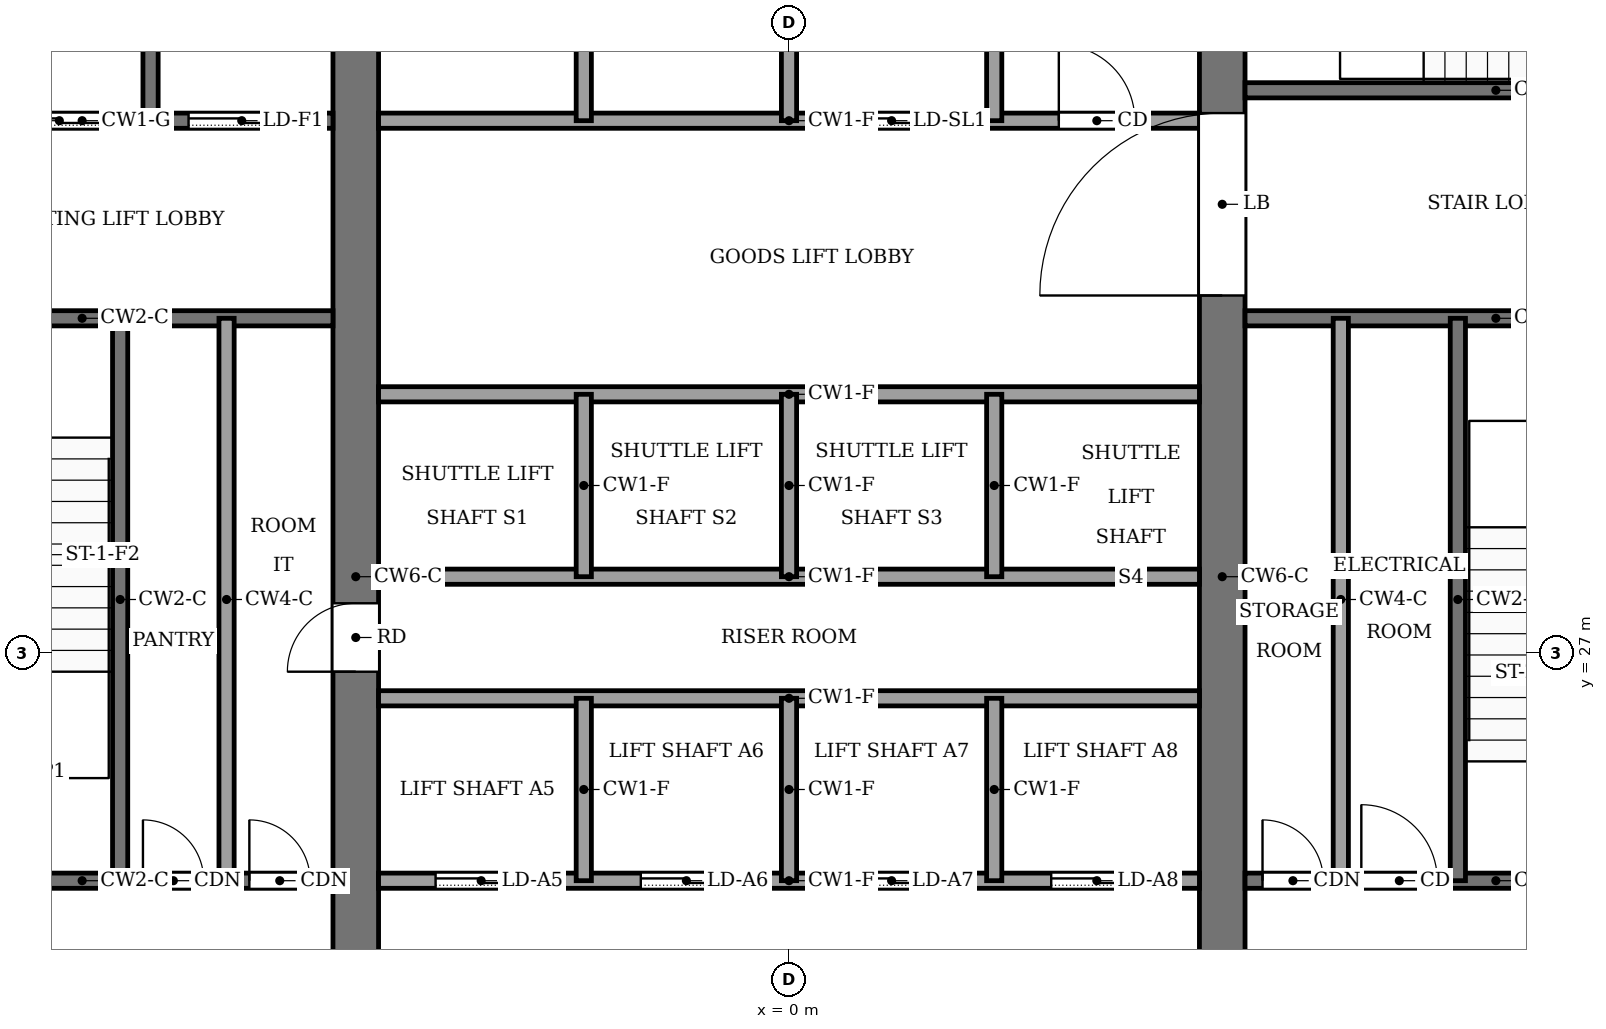
"""IFC4 building model, lengths in metres.
Left out: names, types, materials, properties, quantities, classifications, styles, units other than length and angle.
Written with IfcOpenShell. Run it as: python <this file> out.ifc"""

import sys

from ifc_helpers import new_model, si_unit, direction, frame, frame_2d, origin, place, context, subcontext, project, spatial, rectangle, extrude, element, fill, save


model = new_model("IFC4")
c1 = context("Model", 3, precision=1e-05, world=origin(), true_north=direction((0.0, 1.0)))
c2 = subcontext(c1, "Body", "Model", "MODEL_VIEW")
j1 = project(units=[si_unit("LENGTHUNIT", "METRE"), si_unit("PLANEANGLEUNIT", "RADIAN")], contexts=[c1])
p1 = place(None, origin())
s1 = spatial("IfcSite", under=j1, at=p1, CompositionType="ELEMENT")
p2 = place(p1, origin())
s2 = spatial("IfcBuilding", under=s1, at=p2, CompositionType="ELEMENT")
p3 = place(p2, frame((0.0, 0.0, 182.0)))
s3 = spatial("IfcBuildingStorey", under=s2, at=p3, CompositionType="ELEMENT", Elevation=182.0)
p4 = place(p3, frame((-5.7, 18.4, -0.13), z_axis=(0.0, 0.0, 1.0), x_axis=(0.0, 1.0, 0.0)))
e1 = element("IfcWall", 1, at=p4, inside=s3, PredefinedType="SHEAR", context=c2, shape_type="SweptSolid", body=[
    extrude(rectangle(XDim=19.2, YDim=0.6, at=frame_2d((9.6, 0.0))), origin(), (0.0, 0.0, 1.0), 4.0),
])
p5 = place(p4, frame((8.35, 0.0, 0.13)))
e2 = element("IfcOpeningElement", 2, at=p5, cuts=e1, PredefinedType="OPENING", context=c2, shape_type="SweptSolid", body=[
    extrude(rectangle(XDim=0.9, YDim=2.1, at=frame_2d((0.45, 1.05))), frame((0.0, 0.31, 0.0), z_axis=(0.0, -1.0, 0.0), x_axis=(1.0, 0.0, 0.0)), (0.0, 0.0, 1.0), 0.62),
])
p6 = place(p3, frame((5.7, 18.4, -0.13), z_axis=(0.0, 0.0, 1.0), x_axis=(0.0, 1.0, 0.0)))
e3 = element("IfcWall", 3, at=p6, inside=s3, PredefinedType="SHEAR", context=c2, shape_type="SweptSolid", body=[
    extrude(rectangle(XDim=19.2, YDim=0.6, at=frame_2d((9.6, 0.0))), origin(), (0.0, 0.0, 1.0), 4.0),
])
p7 = place(p6, frame((13.3, 0.0, 0.13)))
e4 = element("IfcOpeningElement", 4, at=p7, cuts=e3, PredefinedType="OPENING", context=c2, shape_type="SweptSolid", body=[
    extrude(rectangle(XDim=2.4, YDim=2.4, at=frame_2d((1.2, 1.2))), frame((0.0, 0.31, 0.0), z_axis=(0.0, -1.0, 0.0), x_axis=(1.0, 0.0, 0.0)), (0.0, 0.0, 1.0), 0.62),
])
p8 = place(p3, frame((-12.6, 24.0, 0.0), z_axis=(0.0, 0.0, 1.0), x_axis=(1.0, 0.0, 0.0)))
e5 = element("IfcWall", 5, at=p8, inside=s3, PredefinedType="PARTITIONING", context=c2, shape_type="SweptSolid", body=[
    extrude(rectangle(XDim=6.6, YDim=0.2, at=frame_2d((3.3, 0.0))), origin(), (0.0, 0.0, 1.0), 3.87),
])
p9 = place(p8, frame((4.1, 0.0, 0.0)))
e6 = element("IfcOpeningElement", 6, at=p9, cuts=e5, PredefinedType="OPENING", context=c2, shape_type="SweptSolid", body=[
    extrude(rectangle(XDim=0.8, YDim=2.1, at=frame_2d((0.4, 1.05))), frame((0.0, 0.11, 0.0), z_axis=(0.0, -1.0, 0.0), x_axis=(1.0, 0.0, 0.0)), (0.0, 0.0, 1.0), 0.22),
])
p10 = place(p8, frame((5.5, 0.0, 0.0)))
e7 = element("IfcOpeningElement", 7, at=p10, cuts=e5, PredefinedType="OPENING", context=c2, shape_type="SweptSolid", body=[
    extrude(rectangle(XDim=0.8, YDim=2.1, at=frame_2d((0.4, 1.05))), frame((0.0, 0.11, 0.0), z_axis=(0.0, -1.0, 0.0), x_axis=(1.0, 0.0, 0.0)), (0.0, 0.0, 1.0), 0.22),
])
p11 = place(p3, frame((-5.4, 24.0, 0.0), z_axis=(0.0, 0.0, 1.0), x_axis=(1.0, 0.0, 0.0)))
e8 = element("IfcWall", 8, at=p11, inside=s3, PredefinedType="PARTITIONING", context=c2, shape_type="SweptSolid", body=[
    extrude(rectangle(XDim=10.8, YDim=0.2, at=frame_2d((5.4, 0.0))), origin(), (0.0, 0.0, 1.0), 3.87),
])
p12 = place(p11, frame((0.75, 0.0, 0.0)))
e9 = element("IfcOpeningElement", 9, at=p12, cuts=e8, PredefinedType="OPENING", context=c2, shape_type="SweptSolid", body=[
    extrude(rectangle(XDim=1.2, YDim=2.2, at=frame_2d((0.6, 1.1))), frame((0.0, 0.11, 0.0), z_axis=(0.0, -1.0, 0.0), x_axis=(1.0, 0.0, 0.0)), (0.0, 0.0, 1.0), 0.22),
])
p13 = place(p11, frame((3.45, 0.0, 0.0)))
e10 = element("IfcOpeningElement", 10, at=p13, cuts=e8, PredefinedType="OPENING", context=c2, shape_type="SweptSolid", body=[
    extrude(rectangle(XDim=1.2, YDim=2.2, at=frame_2d((0.6, 1.1))), frame((0.0, 0.11, 0.0), z_axis=(0.0, -1.0, 0.0), x_axis=(1.0, 0.0, 0.0)), (0.0, 0.0, 1.0), 0.22),
])
p14 = place(p11, frame((6.15, 0.0, 0.0)))
e11 = element("IfcOpeningElement", 11, at=p14, cuts=e8, PredefinedType="OPENING", context=c2, shape_type="SweptSolid", body=[
    extrude(rectangle(XDim=1.2, YDim=2.2, at=frame_2d((0.6, 1.1))), frame((0.0, 0.11, 0.0), z_axis=(0.0, -1.0, 0.0), x_axis=(1.0, 0.0, 0.0)), (0.0, 0.0, 1.0), 0.22),
])
p15 = place(p11, frame((8.85, 0.0, 0.0)))
e12 = element("IfcOpeningElement", 12, at=p15, cuts=e8, PredefinedType="OPENING", context=c2, shape_type="SweptSolid", body=[
    extrude(rectangle(XDim=1.2, YDim=2.2, at=frame_2d((0.6, 1.1))), frame((0.0, 0.11, 0.0), z_axis=(0.0, -1.0, 0.0), x_axis=(1.0, 0.0, 0.0)), (0.0, 0.0, 1.0), 0.22),
])
p16 = place(p3, frame((6.0, 24.0, 0.0), z_axis=(0.0, 0.0, 1.0), x_axis=(1.0, 0.0, 0.0)))
e13 = element("IfcWall", 13, at=p16, inside=s3, PredefinedType="PARTITIONING", context=c2, shape_type="SweptSolid", body=[
    extrude(rectangle(XDim=6.6, YDim=0.2, at=frame_2d((3.3, 0.0))), origin(), (0.0, 0.0, 1.0), 3.87),
])
p17 = place(p16, frame((0.23, 0.0, 0.0)))
e14 = element("IfcOpeningElement", 14, at=p17, cuts=e13, PredefinedType="OPENING", context=c2, shape_type="SweptSolid", body=[
    extrude(rectangle(XDim=0.8, YDim=2.1, at=frame_2d((0.4, 1.05))), frame((0.0, 0.11, 0.0), z_axis=(0.0, -1.0, 0.0), x_axis=(1.0, 0.0, 0.0)), (0.0, 0.0, 1.0), 0.22),
])
p18 = place(p16, frame((1.53, 0.0, 0.0)))
e15 = element("IfcOpeningElement", 15, at=p18, cuts=e13, PredefinedType="OPENING", context=c2, shape_type="SweptSolid", body=[
    extrude(rectangle(XDim=1.0, YDim=2.1, at=frame_2d((0.5, 1.05))), frame((0.0, 0.11, 0.0), z_axis=(0.0, -1.0, 0.0), x_axis=(1.0, 0.0, 0.0)), (0.0, 0.0, 1.0), 0.22),
])
p19 = place(p16, frame((4.4, 0.0, 0.0)))
e16 = element("IfcOpeningElement", 16, at=p19, cuts=e13, PredefinedType="OPENING", context=c2, shape_type="SweptSolid", body=[
    extrude(rectangle(XDim=1.2, YDim=2.2, at=frame_2d((0.6, 1.1))), frame((0.0, 0.11, 0.0), z_axis=(0.0, -1.0, 0.0), x_axis=(1.0, 0.0, 0.0)), (0.0, 0.0, 1.0), 0.22),
])
for number, where, z_axis, x_axis in (
    (17, (-5.4, 26.4, 0.0), (0.0, 0.0, 1.0), (1.0, 0.0, 0.0)),
    (18, (-5.4, 28.0, 0.0), (0.0, 0.0, 1.0), (1.0, 0.0, 0.0)),
    (19, (-5.4, 30.4, 0.0), (0.0, 0.0, 1.0), (1.0, 0.0, 0.0)),
):
    element("IfcWall", number, at=place(p3, frame(where, z_axis=z_axis, x_axis=x_axis)), inside=s3, PredefinedType="PARTITIONING", context=c2, shape_type="SweptSolid", body=[
        extrude(rectangle(XDim=10.8, YDim=0.2, at=frame_2d((5.4, 0.0))), origin(), (0.0, 0.0, 1.0), 3.87),
    ])
p20 = place(p3, frame((-12.6, 31.4, 0.0), z_axis=(0.0, 0.0, 1.0), x_axis=(1.0, 0.0, 0.0)))
e20 = element("IfcWall", 20, at=p20, inside=s3, PredefinedType="PARTITIONING", context=c2, shape_type="SweptSolid", body=[
    extrude(rectangle(XDim=6.6, YDim=0.2, at=frame_2d((3.3, 0.0))), origin(), (0.0, 0.0, 1.0), 3.87),
])
p21 = place(p20, frame((1.0, 0.0, 0.0)))
e21 = element("IfcOpeningElement", 21, at=p21, cuts=e20, PredefinedType="OPENING", context=c2, shape_type="SweptSolid", body=[
    extrude(rectangle(XDim=1.2, YDim=2.2, at=frame_2d((0.6, 1.1))), frame((0.0, 0.11, 0.0), z_axis=(0.0, -1.0, 0.0), x_axis=(1.0, 0.0, 0.0)), (0.0, 0.0, 1.0), 0.22),
])
p22 = place(p3, frame((6.0, 31.4, 0.0), z_axis=(0.0, 0.0, 1.0), x_axis=(1.0, 0.0, 0.0)))
e22 = element("IfcWall", 22, at=p22, inside=s3, PredefinedType="PARTITIONING", context=c2, shape_type="SweptSolid", body=[
    extrude(rectangle(XDim=6.6, YDim=0.2, at=frame_2d((3.3, 0.0))), origin(), (0.0, 0.0, 1.0), 3.87),
])
p23 = place(p3, frame((-12.6, 34.0, 0.0), z_axis=(0.0, 0.0, 1.0), x_axis=(1.0, 0.0, 0.0)))
e23 = element("IfcWall", 23, at=p23, inside=s3, PredefinedType="PARTITIONING", context=c2, shape_type="SweptSolid", body=[
    extrude(rectangle(XDim=6.6, YDim=0.2, at=frame_2d((3.3, 0.0))), origin(), (0.0, 0.0, 1.0), 3.87),
])
p24 = place(p23, frame((4.7, 0.0, 0.0)))
e24 = element("IfcOpeningElement", 24, at=p24, cuts=e23, PredefinedType="OPENING", context=c2, shape_type="SweptSolid", body=[
    extrude(rectangle(XDim=1.4, YDim=2.2, at=frame_2d((0.7, 1.1))), frame((0.0, 0.11, 0.0), z_axis=(0.0, -1.0, 0.0), x_axis=(1.0, 0.0, 0.0)), (0.0, 0.0, 1.0), 0.22),
])
p25 = place(p23, frame((2.3, 0.0, 0.0)))
e25 = element("IfcOpeningElement", 25, at=p25, cuts=e23, PredefinedType="OPENING", context=c2, shape_type="SweptSolid", body=[
    extrude(rectangle(XDim=1.4, YDim=2.2, at=frame_2d((0.7, 1.1))), frame((0.0, 0.11, 0.0), z_axis=(0.0, -1.0, 0.0), x_axis=(1.0, 0.0, 0.0)), (0.0, 0.0, 1.0), 0.22),
])
p26 = place(p23, frame((0.45, 0.0, 0.0)))
e26 = element("IfcOpeningElement", 26, at=p26, cuts=e23, PredefinedType="OPENING", context=c2, shape_type="SweptSolid", body=[
    extrude(rectangle(XDim=0.9, YDim=2.1, at=frame_2d((0.45, 1.05))), frame((0.0, 0.11, 0.0), z_axis=(0.0, -1.0, 0.0), x_axis=(1.0, 0.0, 0.0)), (0.0, 0.0, 1.0), 0.22),
])
p27 = place(p3, frame((-5.4, 34.0, 0.0), z_axis=(0.0, 0.0, 1.0), x_axis=(1.0, 0.0, 0.0)))
e27 = element("IfcWall", 27, at=p27, inside=s3, PredefinedType="PARTITIONING", context=c2, shape_type="SweptSolid", body=[
    extrude(rectangle(XDim=10.8, YDim=0.2, at=frame_2d((5.4, 0.0))), origin(), (0.0, 0.0, 1.0), 3.87),
])
p28 = place(p27, frame((6.15, 0.0, 0.0)))
e28 = element("IfcOpeningElement", 28, at=p28, cuts=e27, PredefinedType="OPENING", context=c2, shape_type="SweptSolid", body=[
    extrude(rectangle(XDim=1.2, YDim=2.2, at=frame_2d((0.6, 1.1))), frame((0.0, 0.11, 0.0), z_axis=(0.0, -1.0, 0.0), x_axis=(1.0, 0.0, 0.0)), (0.0, 0.0, 1.0), 0.22),
])
p29 = place(p27, frame((8.95, 0.0, 0.0)))
e29 = element("IfcOpeningElement", 29, at=p29, cuts=e27, PredefinedType="OPENING", context=c2, shape_type="SweptSolid", body=[
    extrude(rectangle(XDim=1.0, YDim=2.1, at=frame_2d((0.5, 1.05))), frame((0.0, 0.11, 0.0), z_axis=(0.0, -1.0, 0.0), x_axis=(1.0, 0.0, 0.0)), (0.0, 0.0, 1.0), 0.22),
])
p30 = place(p3, frame((6.0, 34.4, 0.0), z_axis=(0.0, 0.0, 1.0), x_axis=(1.0, 0.0, 0.0)))
e30 = element("IfcWall", 30, at=p30, inside=s3, PredefinedType="PARTITIONING", context=c2, shape_type="SweptSolid", body=[
    extrude(rectangle(XDim=6.6, YDim=0.2, at=frame_2d((3.3, 0.0))), origin(), (0.0, 0.0, 1.0), 3.87),
])
p31 = place(p30, frame((4.8, 0.0, 0.0)))
e31 = element("IfcOpeningElement", 31, at=p31, cuts=e30, PredefinedType="OPENING", context=c2, shape_type="SweptSolid", body=[
    extrude(rectangle(XDim=1.2, YDim=2.2, at=frame_2d((0.6, 1.1))), frame((0.0, 0.11, 0.0), z_axis=(0.0, -1.0, 0.0), x_axis=(1.0, 0.0, 0.0)), (0.0, 0.0, 1.0), 0.22),
])
p32 = place(p3, frame((-8.8, 24.0, 0.0), z_axis=(0.0, 0.0, 1.0), x_axis=(0.0, 1.0, 0.0)))
e32 = element("IfcWall", 32, at=p32, inside=s3, PredefinedType="PARTITIONING", context=c2, shape_type="SweptSolid", body=[
    extrude(rectangle(XDim=7.4, YDim=0.2, at=frame_2d((3.7, 0.0))), origin(), (0.0, 0.0, 1.0), 3.87),
])
p33 = place(p3, frame((-8.4, 34.0, 0.0), z_axis=(0.0, 0.0, 1.0), x_axis=(0.0, 1.0, 0.0)))
e33 = element("IfcWall", 33, at=p33, inside=s3, PredefinedType="PARTITIONING", context=c2, shape_type="SweptSolid", body=[
    extrude(rectangle(XDim=3.6, YDim=0.2, at=frame_2d((1.8, 0.0))), origin(), (0.0, 0.0, 1.0), 3.87),
])
p34 = place(p3, frame((-7.4, 24.0, 0.0), z_axis=(0.0, 0.0, 1.0), x_axis=(0.0, 1.0, 0.0)))
e34 = element("IfcWall", 34, at=p34, inside=s3, PredefinedType="PARTITIONING", context=c2, shape_type="SweptSolid", body=[
    extrude(rectangle(XDim=7.4, YDim=0.2, at=frame_2d((3.7, 0.0))), origin(), (0.0, 0.0, 1.0), 3.87),
])
for number, where, z_axis, x_axis in (
    (35, (-2.7, 24.0, 0.0), (0.0, 0.0, 1.0), (0.0, 1.0, 0.0)),
    (36, (-2.7, 28.0, 0.0), (0.0, 0.0, 1.0), (0.0, 1.0, 0.0)),
):
    element("IfcWall", number, at=place(p3, frame(where, z_axis=z_axis, x_axis=x_axis)), inside=s3, PredefinedType="PARTITIONING", context=c2, shape_type="SweptSolid", body=[
        extrude(rectangle(XDim=2.4, YDim=0.2, at=frame_2d((1.2, 0.0))), origin(), (0.0, 0.0, 1.0), 3.87),
    ])
p35 = place(p3, frame((-2.7, 34.0, 0.0), z_axis=(0.0, 0.0, 1.0), x_axis=(0.0, 1.0, 0.0)))
e37 = element("IfcWall", 37, at=p35, inside=s3, PredefinedType="PARTITIONING", context=c2, shape_type="SweptSolid", body=[
    extrude(rectangle(XDim=3.6, YDim=0.2, at=frame_2d((1.8, 0.0))), origin(), (0.0, 0.0, 1.0), 3.87),
])
for number, where, z_axis, x_axis in (
    (38, (0.0, 24.0, 0.0), (0.0, 0.0, 1.0), (0.0, 1.0, 0.0)),
    (39, (0.0, 28.0, 0.0), (0.0, 0.0, 1.0), (0.0, 1.0, 0.0)),
):
    element("IfcWall", number, at=place(p3, frame(where, z_axis=z_axis, x_axis=x_axis)), inside=s3, PredefinedType="PARTITIONING", context=c2, shape_type="SweptSolid", body=[
        extrude(rectangle(XDim=2.4, YDim=0.2, at=frame_2d((1.2, 0.0))), origin(), (0.0, 0.0, 1.0), 3.87),
    ])
p36 = place(p3, frame((0.0, 34.0, 0.0), z_axis=(0.0, 0.0, 1.0), x_axis=(0.0, 1.0, 0.0)))
e40 = element("IfcWall", 40, at=p36, inside=s3, PredefinedType="PARTITIONING", context=c2, shape_type="SweptSolid", body=[
    extrude(rectangle(XDim=3.6, YDim=0.2, at=frame_2d((1.8, 0.0))), origin(), (0.0, 0.0, 1.0), 3.87),
])
for number, where, z_axis, x_axis in (
    (41, (2.7, 24.0, 0.0), (0.0, 0.0, 1.0), (0.0, 1.0, 0.0)),
    (42, (2.7, 28.0, 0.0), (0.0, 0.0, 1.0), (0.0, 1.0, 0.0)),
):
    element("IfcWall", number, at=place(p3, frame(where, z_axis=z_axis, x_axis=x_axis)), inside=s3, PredefinedType="PARTITIONING", context=c2, shape_type="SweptSolid", body=[
        extrude(rectangle(XDim=2.4, YDim=0.2, at=frame_2d((1.2, 0.0))), origin(), (0.0, 0.0, 1.0), 3.87),
    ])
p37 = place(p3, frame((2.7, 34.0, 0.0), z_axis=(0.0, 0.0, 1.0), x_axis=(0.0, 1.0, 0.0)))
e43 = element("IfcWall", 43, at=p37, inside=s3, PredefinedType="PARTITIONING", context=c2, shape_type="SweptSolid", body=[
    extrude(rectangle(XDim=3.6, YDim=0.2, at=frame_2d((1.8, 0.0))), origin(), (0.0, 0.0, 1.0), 3.87),
])
for number, where, z_axis, x_axis in (
    (44, (7.26, 24.0, 0.0), (0.0, 0.0, 1.0), (0.0, 1.0, 0.0)),
    (45, (8.8, 24.0, 0.0), (0.0, 0.0, 1.0), (0.0, 1.0, 0.0)),
):
    element("IfcWall", number, at=place(p3, frame(where, z_axis=z_axis, x_axis=x_axis)), inside=s3, PredefinedType="PARTITIONING", context=c2, shape_type="SweptSolid", body=[
        extrude(rectangle(XDim=7.4, YDim=0.2, at=frame_2d((3.7, 0.0))), origin(), (0.0, 0.0, 1.0), 3.87),
    ])
p38 = place(p12, origin())
e46 = element("IfcDoor", 46, at=p38, inside=s3, OperationType="SLIDING_TO_LEFT", PredefinedType="DOOR", context=c2, shape_type="SweptSolid", body=[
    extrude(rectangle(XDim=1.2, YDim=2.2, at=frame_2d((0.6, 1.1))), frame((0.0, 0.025, 0.0), z_axis=(0.0, -1.0, 0.0), x_axis=(1.0, 0.0, 0.0)), (0.0, 0.0, 1.0), 0.05),
])
fill(e9, e46)
p39 = place(p13, origin())
e47 = element("IfcDoor", 47, at=p39, inside=s3, OperationType="SLIDING_TO_LEFT", PredefinedType="DOOR", context=c2, shape_type="SweptSolid", body=[
    extrude(rectangle(XDim=1.2, YDim=2.2, at=frame_2d((0.6, 1.1))), frame((0.0, 0.025, 0.0), z_axis=(0.0, -1.0, 0.0), x_axis=(1.0, 0.0, 0.0)), (0.0, 0.0, 1.0), 0.05),
])
fill(e10, e47)
p40 = place(p14, origin())
e48 = element("IfcDoor", 48, at=p40, inside=s3, OperationType="SLIDING_TO_LEFT", PredefinedType="DOOR", context=c2, shape_type="SweptSolid", body=[
    extrude(rectangle(XDim=1.2, YDim=2.2, at=frame_2d((0.6, 1.1))), frame((0.0, 0.025, 0.0), z_axis=(0.0, -1.0, 0.0), x_axis=(1.0, 0.0, 0.0)), (0.0, 0.0, 1.0), 0.05),
])
fill(e11, e48)
p41 = place(p15, origin())
e49 = element("IfcDoor", 49, at=p41, inside=s3, OperationType="SLIDING_TO_LEFT", PredefinedType="DOOR", context=c2, shape_type="SweptSolid", body=[
    extrude(rectangle(XDim=1.2, YDim=2.2, at=frame_2d((0.6, 1.1))), frame((0.0, 0.025, 0.0), z_axis=(0.0, -1.0, 0.0), x_axis=(1.0, 0.0, 0.0)), (0.0, 0.0, 1.0), 0.05),
])
fill(e12, e49)
p42 = place(p28, origin())
e50 = element("IfcDoor", 50, at=p42, inside=s3, OperationType="SLIDING_TO_LEFT", PredefinedType="DOOR", context=c2, shape_type="SweptSolid", body=[
    extrude(rectangle(XDim=1.2, YDim=2.2, at=frame_2d((0.6, 1.1))), frame((0.0, 0.025, 0.0), z_axis=(0.0, -1.0, 0.0), x_axis=(1.0, 0.0, 0.0)), (0.0, 0.0, 1.0), 0.05),
])
fill(e28, e50)
p43 = place(p24, origin())
e51 = element("IfcDoor", 51, at=p43, inside=s3, OperationType="SLIDING_TO_LEFT", PredefinedType="DOOR", context=c2, shape_type="SweptSolid", body=[
    extrude(rectangle(XDim=1.4, YDim=2.2, at=frame_2d((0.7, 1.1))), frame((0.0, 0.025, 0.0), z_axis=(0.0, -1.0, 0.0), x_axis=(1.0, 0.0, 0.0)), (0.0, 0.0, 1.0), 0.05),
])
fill(e24, e51)
p44 = place(p25, origin())
e52 = element("IfcDoor", 52, at=p44, inside=s3, OperationType="SLIDING_TO_LEFT", PredefinedType="DOOR", context=c2, shape_type="SweptSolid", body=[
    extrude(rectangle(XDim=1.4, YDim=2.2, at=frame_2d((0.7, 1.1))), frame((0.0, 0.025, 0.0), z_axis=(0.0, -1.0, 0.0), x_axis=(1.0, 0.0, 0.0)), (0.0, 0.0, 1.0), 0.05),
])
fill(e25, e52)
p45 = place(p9, origin())
e53 = element("IfcDoor", 53, at=p45, inside=s3, OperationType="SINGLE_SWING_LEFT", PredefinedType="DOOR", context=c2, shape_type="SweptSolid", body=[
    extrude(rectangle(XDim=0.8, YDim=2.1, at=frame_2d((0.4, 1.05))), frame((0.0, 0.025, 0.0), z_axis=(0.0, -1.0, 0.0), x_axis=(1.0, 0.0, 0.0)), (0.0, 0.0, 1.0), 0.05),
])
fill(e6, e53)
p46 = place(p10, origin())
e54 = element("IfcDoor", 54, at=p46, inside=s3, OperationType="SINGLE_SWING_RIGHT", PredefinedType="DOOR", context=c2, shape_type="SweptSolid", body=[
    extrude(rectangle(XDim=0.8, YDim=2.1, at=frame_2d((0.4, 1.05))), frame((0.0, 0.025, 0.0), z_axis=(0.0, -1.0, 0.0), x_axis=(1.0, 0.0, 0.0)), (0.0, 0.0, 1.0), 0.05),
])
fill(e7, e54)
p47 = place(p17, origin())
e55 = element("IfcDoor", 55, at=p47, inside=s3, OperationType="SINGLE_SWING_RIGHT", PredefinedType="DOOR", context=c2, shape_type="SweptSolid", body=[
    extrude(rectangle(XDim=0.8, YDim=2.1, at=frame_2d((0.4, 1.05))), frame((0.0, 0.025, 0.0), z_axis=(0.0, -1.0, 0.0), x_axis=(1.0, 0.0, 0.0)), (0.0, 0.0, 1.0), 0.05),
])
fill(e14, e55)
p48 = place(p18, origin())
e56 = element("IfcDoor", 56, at=p48, inside=s3, OperationType="SINGLE_SWING_LEFT", PredefinedType="DOOR", context=c2, shape_type="SweptSolid", body=[
    extrude(rectangle(XDim=1.0, YDim=2.1, at=frame_2d((0.5, 1.05))), frame((0.0, 0.025, 0.0), z_axis=(0.0, -1.0, 0.0), x_axis=(1.0, 0.0, 0.0)), (0.0, 0.0, 1.0), 0.05),
])
fill(e15, e56)
p49 = place(p29, origin())
e57 = element("IfcDoor", 57, at=p49, inside=s3, OperationType="SINGLE_SWING_LEFT", PredefinedType="DOOR", context=c2, shape_type="SweptSolid", body=[
    extrude(rectangle(XDim=1.0, YDim=2.1, at=frame_2d((0.5, 1.05))), frame((0.0, 0.025, 0.0), z_axis=(0.0, -1.0, 0.0), x_axis=(1.0, 0.0, 0.0)), (0.0, 0.0, 1.0), 0.05),
])
fill(e29, e57)
p50 = place(p5, origin())
e58 = element("IfcDoor", 58, at=p50, inside=s3, OperationType="SINGLE_SWING_RIGHT", PredefinedType="DOOR", context=c2, shape_type="SweptSolid", body=[
    extrude(rectangle(XDim=0.9, YDim=2.1, at=frame_2d((0.45, 1.05))), frame((0.0, 0.025, 0.0), z_axis=(0.0, -1.0, 0.0), x_axis=(1.0, 0.0, 0.0)), (0.0, 0.0, 1.0), 0.05),
])
fill(e2, e58)
p51 = place(p7, origin())
e59 = element("IfcDoor", 59, at=p51, inside=s3, OperationType="DOUBLE_DOOR_SINGLE_SWING", PredefinedType="DOOR", context=c2, shape_type="SweptSolid", body=[
    extrude(rectangle(XDim=2.4, YDim=2.4, at=frame_2d((1.2, 1.2))), frame((0.0, 0.025, 0.0), z_axis=(0.0, -1.0, 0.0), x_axis=(1.0, 0.0, 0.0)), (0.0, 0.0, 1.0), 0.05),
])
fill(e4, e59)
save(model, sys.argv[1])
